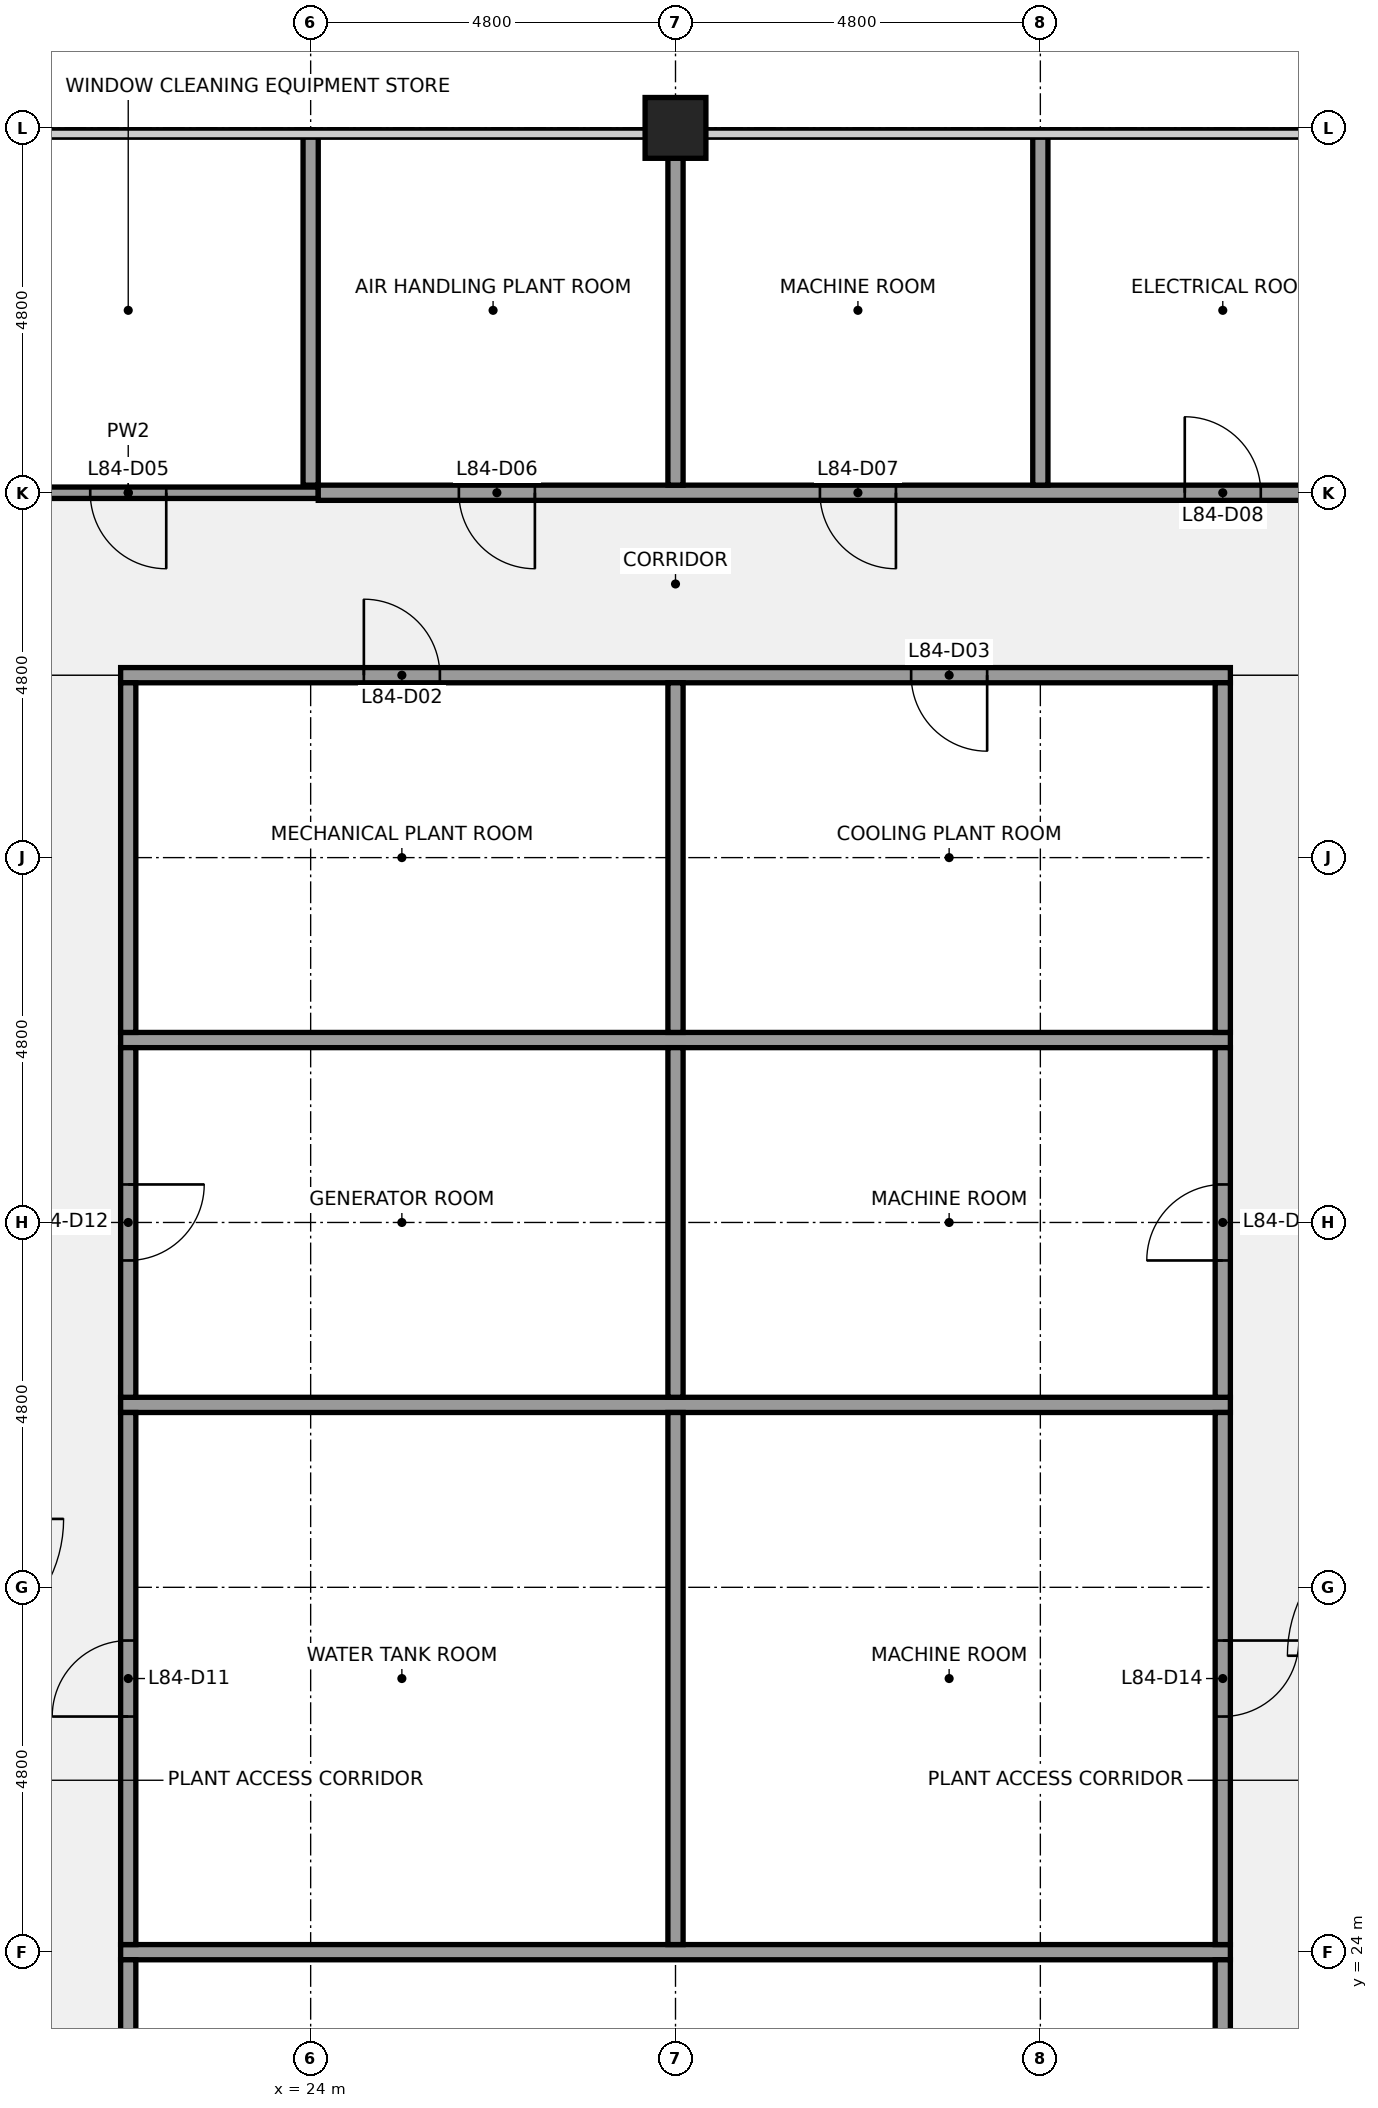
"""IFC4 building model, lengths in metres.
Left out: names, types, materials, properties, quantities, classifications, styles, units other than length and angle.
Written with IfcOpenShell. Run it as: python <this file> out.ifc"""

import sys

from ifc_helpers import new_model, si_unit, direction, frame, frame_2d, origin, origin_2d, place, context, subcontext, project, spatial, rectangle, extrude, element, fill, save


model = new_model("IFC4")
c1 = context("Model", 3, precision=1e-05, world=origin(), true_north=direction((0.0, 1.0)))
c2 = subcontext(c1, "Body", "Model", "MODEL_VIEW")
j1 = project(units=[si_unit("LENGTHUNIT", "METRE"), si_unit("PLANEANGLEUNIT", "RADIAN")], contexts=[c1])
p1 = place(None, origin())
s1 = spatial("IfcSite", under=j1, at=p1, CompositionType="ELEMENT")
p2 = place(p1, origin())
s2 = spatial("IfcBuilding", under=s1, at=p2, CompositionType="ELEMENT")
p3 = place(p2, frame((0.0, 0.0, 374.3)))
s3 = spatial("IfcBuildingStorey", under=s2, at=p3, CompositionType="ELEMENT", Elevation=374.3)
p4 = place(p3, frame((28.8, 48.0, 0.0), z_axis=(0.0, 0.0, 1.0), x_axis=(1.0, 0.0, 0.0)))
e1 = element("IfcColumn", 1, at=p4, inside=s3, PredefinedType="COLUMN", context=c2, shape_type="SweptSolid", body=[
    extrude(rectangle(XDim=0.8, YDim=0.8, at=origin_2d()), origin(), (0.0, 0.0, 1.0), 4.0),
])
for number, where, z_axis, x_axis in (
    (2, (21.5, 24.0, 0.0), (0.0, 0.0, 1.0), (1.0, 0.0, 0.0)),
    (3, (21.5, 31.2, 0.0), (0.0, 0.0, 1.0), (1.0, 0.0, 0.0)),
    (4, (21.5, 36.0, 0.0), (0.0, 0.0, 1.0), (1.0, 0.0, 0.0)),
):
    element("IfcWall", number, at=place(p3, frame(where, z_axis=z_axis, x_axis=x_axis)), inside=s3, PredefinedType="PARTITIONING", context=c2, shape_type="SweptSolid", body=[
        extrude(rectangle(XDim=14.6, YDim=0.2, at=frame_2d((7.3, 0.0))), origin(), (0.0, 0.0, 1.0), 2.9),
    ])
p5 = place(p3, frame((21.5, 40.8, 0.0), z_axis=(0.0, 0.0, 1.0), x_axis=(1.0, 0.0, 0.0)))
e5 = element("IfcWall", 5, at=p5, inside=s3, PredefinedType="PARTITIONING", context=c2, shape_type="SweptSolid", body=[
    extrude(rectangle(XDim=14.6, YDim=0.2, at=frame_2d((7.3, 0.0))), origin(), (0.0, 0.0, 1.0), 2.9),
])
p6 = place(p5, frame((3.2, 0.0, 0.0)))
e6 = element("IfcOpeningElement", 6, at=p6, cuts=e5, PredefinedType="OPENING", context=c2, shape_type="SweptSolid", body=[
    extrude(rectangle(XDim=1.0, YDim=2.1, at=frame_2d((0.5, 1.05))), frame((0.0, 0.11, 0.0), z_axis=(0.0, -1.0, 0.0), x_axis=(1.0, 0.0, 0.0)), (0.0, 0.0, 1.0), 0.22),
])
p7 = place(p5, frame((10.4, 0.0, 0.0)))
e7 = element("IfcOpeningElement", 7, at=p7, cuts=e5, PredefinedType="OPENING", context=c2, shape_type="SweptSolid", body=[
    extrude(rectangle(XDim=1.0, YDim=2.1, at=frame_2d((0.5, 1.05))), frame((0.0, 0.11, 0.0), z_axis=(0.0, -1.0, 0.0), x_axis=(1.0, 0.0, 0.0)), (0.0, 0.0, 1.0), 0.22),
])
p8 = place(p3, frame((19.1, 43.2, 0.0), z_axis=(0.0, 0.0, 1.0), x_axis=(1.0, 0.0, 0.0)))
e8 = element("IfcWall", 8, at=p8, inside=s3, PredefinedType="PARTITIONING", context=c2, shape_type="SweptSolid", body=[
    extrude(rectangle(XDim=5.0, YDim=0.15, at=frame_2d((2.5, 0.0))), origin(), (0.0, 0.0, 1.0), 2.9),
])
p9 = place(p8, frame((2.0, 0.0, 0.0)))
e9 = element("IfcOpeningElement", 9, at=p9, cuts=e8, PredefinedType="OPENING", context=c2, shape_type="SweptSolid", body=[
    extrude(rectangle(XDim=1.0, YDim=2.1, at=frame_2d((0.5, 1.05))), frame((0.0, 0.085, 0.0), z_axis=(0.0, -1.0, 0.0), x_axis=(1.0, 0.0, 0.0)), (0.0, 0.0, 1.0), 0.17),
])
p10 = place(p3, frame((24.1, 43.2, 0.0), z_axis=(0.0, 0.0, 1.0), x_axis=(1.0, 0.0, 0.0)))
e10 = element("IfcWall", 10, at=p10, inside=s3, PredefinedType="PARTITIONING", context=c2, shape_type="SweptSolid", body=[
    extrude(rectangle(XDim=14.4, YDim=0.2, at=frame_2d((7.2, 0.0))), origin(), (0.0, 0.0, 1.0), 2.9),
])
p11 = place(p10, frame((1.85, 0.0, 0.0)))
e11 = element("IfcOpeningElement", 11, at=p11, cuts=e10, PredefinedType="OPENING", context=c2, shape_type="SweptSolid", body=[
    extrude(rectangle(XDim=1.0, YDim=2.1, at=frame_2d((0.5, 1.05))), frame((0.0, 0.11, 0.0), z_axis=(0.0, -1.0, 0.0), x_axis=(1.0, 0.0, 0.0)), (0.0, 0.0, 1.0), 0.22),
])
p12 = place(p10, frame((6.6, 0.0, 0.0)))
e12 = element("IfcOpeningElement", 12, at=p12, cuts=e10, PredefinedType="OPENING", context=c2, shape_type="SweptSolid", body=[
    extrude(rectangle(XDim=1.0, YDim=2.1, at=frame_2d((0.5, 1.05))), frame((0.0, 0.11, 0.0), z_axis=(0.0, -1.0, 0.0), x_axis=(1.0, 0.0, 0.0)), (0.0, 0.0, 1.0), 0.22),
])
p13 = place(p10, frame((11.4, 0.0, 0.0)))
e13 = element("IfcOpeningElement", 13, at=p13, cuts=e10, PredefinedType="OPENING", context=c2, shape_type="SweptSolid", body=[
    extrude(rectangle(XDim=1.0, YDim=2.1, at=frame_2d((0.5, 1.05))), frame((0.0, 0.11, 0.0), z_axis=(0.0, -1.0, 0.0), x_axis=(1.0, 0.0, 0.0)), (0.0, 0.0, 1.0), 0.22),
])
p14 = place(p3, frame((21.6, 16.9, 0.0), z_axis=(0.0, 0.0, 1.0), x_axis=(0.0, 1.0, 0.0)))
e14 = element("IfcWall", 14, at=p14, inside=s3, PredefinedType="PARTITIONING", context=c2, shape_type="SweptSolid", body=[
    extrude(rectangle(XDim=7.0, YDim=0.2, at=frame_2d((3.5, 0.0))), origin(), (0.0, 0.0, 1.0), 2.9),
])
p15 = place(p14, frame((3.0, 0.0, 0.0)))
e15 = element("IfcOpeningElement", 15, at=p15, cuts=e14, PredefinedType="OPENING", context=c2, shape_type="SweptSolid", body=[
    extrude(rectangle(XDim=1.0, YDim=2.1, at=frame_2d((0.5, 1.05))), frame((0.0, 0.11, 0.0), z_axis=(0.0, -1.0, 0.0), x_axis=(1.0, 0.0, 0.0)), (0.0, 0.0, 1.0), 0.22),
])
p16 = place(p3, frame((21.6, 24.1, 0.0), z_axis=(0.0, 0.0, 1.0), x_axis=(0.0, 1.0, 0.0)))
e16 = element("IfcWall", 16, at=p16, inside=s3, PredefinedType="PARTITIONING", context=c2, shape_type="SweptSolid", body=[
    extrude(rectangle(XDim=7.0, YDim=0.2, at=frame_2d((3.5, 0.0))), origin(), (0.0, 0.0, 1.0), 2.9),
])
p17 = place(p16, frame((3.0, 0.0, 0.0)))
e17 = element("IfcOpeningElement", 17, at=p17, cuts=e16, PredefinedType="OPENING", context=c2, shape_type="SweptSolid", body=[
    extrude(rectangle(XDim=1.0, YDim=2.1, at=frame_2d((0.5, 1.05))), frame((0.0, 0.11, 0.0), z_axis=(0.0, -1.0, 0.0), x_axis=(1.0, 0.0, 0.0)), (0.0, 0.0, 1.0), 0.22),
])
p18 = place(p3, frame((21.6, 31.3, 0.0), z_axis=(0.0, 0.0, 1.0), x_axis=(0.0, 1.0, 0.0)))
e18 = element("IfcWall", 18, at=p18, inside=s3, PredefinedType="PARTITIONING", context=c2, shape_type="SweptSolid", body=[
    extrude(rectangle(XDim=4.6, YDim=0.2, at=frame_2d((2.3, 0.0))), origin(), (0.0, 0.0, 1.0), 2.9),
])
p19 = place(p18, frame((1.8, 0.0, 0.0)))
e19 = element("IfcOpeningElement", 19, at=p19, cuts=e18, PredefinedType="OPENING", context=c2, shape_type="SweptSolid", body=[
    extrude(rectangle(XDim=1.0, YDim=2.1, at=frame_2d((0.5, 1.05))), frame((0.0, 0.11, 0.0), z_axis=(0.0, -1.0, 0.0), x_axis=(1.0, 0.0, 0.0)), (0.0, 0.0, 1.0), 0.22),
])
for number, where, z_axis, x_axis in (
    (20, (21.6, 36.1, 0.0), (0.0, 0.0, 1.0), (0.0, 1.0, 0.0)),
    (21, (24.0, 43.3, 0.0), (0.0, 0.0, 1.0), (0.0, 1.0, 0.0)),
):
    element("IfcWall", number, at=place(p3, frame(where, z_axis=z_axis, x_axis=x_axis)), inside=s3, PredefinedType="PARTITIONING", context=c2, shape_type="SweptSolid", body=[
        extrude(rectangle(XDim=4.6, YDim=0.2, at=frame_2d((2.3, 0.0))), origin(), (0.0, 0.0, 1.0), 2.9),
    ])
p20 = place(p3, frame((28.8, 24.1, 0.0), z_axis=(0.0, 0.0, 1.0), x_axis=(0.0, 1.0, 0.0)))
e22 = element("IfcWall", 22, at=p20, inside=s3, PredefinedType="PARTITIONING", context=c2, shape_type="SweptSolid", body=[
    extrude(rectangle(XDim=7.0, YDim=0.2, at=frame_2d((3.5, 0.0))), origin(), (0.0, 0.0, 1.0), 2.9),
])
for number, where, z_axis, x_axis in (
    (23, (28.8, 31.3, 0.0), (0.0, 0.0, 1.0), (0.0, 1.0, 0.0)),
    (24, (28.8, 36.1, 0.0), (0.0, 0.0, 1.0), (0.0, 1.0, 0.0)),
):
    element("IfcWall", number, at=place(p3, frame(where, z_axis=z_axis, x_axis=x_axis)), inside=s3, PredefinedType="PARTITIONING", context=c2, shape_type="SweptSolid", body=[
        extrude(rectangle(XDim=4.6, YDim=0.2, at=frame_2d((2.3, 0.0))), origin(), (0.0, 0.0, 1.0), 2.9),
    ])
p21 = place(p3, frame((28.8, 43.3, 0.0), z_axis=(0.0, 0.0, 1.0), x_axis=(0.0, 1.0, 0.0)))
e25 = element("IfcWall", 25, at=p21, inside=s3, PredefinedType="PARTITIONING", context=c2, shape_type="SweptSolid", body=[
    extrude(rectangle(XDim=4.3, YDim=0.2, at=frame_2d((2.15, 0.0))), origin(), (0.0, 0.0, 1.0), 2.9),
])
p22 = place(p3, frame((33.6, 43.3, 0.0), z_axis=(0.0, 0.0, 1.0), x_axis=(0.0, 1.0, 0.0)))
e26 = element("IfcWall", 26, at=p22, inside=s3, PredefinedType="PARTITIONING", context=c2, shape_type="SweptSolid", body=[
    extrude(rectangle(XDim=4.6, YDim=0.2, at=frame_2d((2.3, 0.0))), origin(), (0.0, 0.0, 1.0), 2.9),
])
p23 = place(p3, frame((36.0, 16.9, 0.0), z_axis=(0.0, 0.0, 1.0), x_axis=(0.0, 1.0, 0.0)))
e27 = element("IfcWall", 27, at=p23, inside=s3, PredefinedType="PARTITIONING", context=c2, shape_type="SweptSolid", body=[
    extrude(rectangle(XDim=7.0, YDim=0.2, at=frame_2d((3.5, 0.0))), origin(), (0.0, 0.0, 1.0), 2.9),
])
p24 = place(p3, frame((36.0, 24.1, 0.0), z_axis=(0.0, 0.0, 1.0), x_axis=(0.0, 1.0, 0.0)))
e28 = element("IfcWall", 28, at=p24, inside=s3, PredefinedType="PARTITIONING", context=c2, shape_type="SweptSolid", body=[
    extrude(rectangle(XDim=7.0, YDim=0.2, at=frame_2d((3.5, 0.0))), origin(), (0.0, 0.0, 1.0), 2.9),
])
p25 = place(p24, frame((3.0, 0.0, 0.0)))
e29 = element("IfcOpeningElement", 29, at=p25, cuts=e28, PredefinedType="OPENING", context=c2, shape_type="SweptSolid", body=[
    extrude(rectangle(XDim=1.0, YDim=2.1, at=frame_2d((0.5, 1.05))), frame((0.0, 0.11, 0.0), z_axis=(0.0, -1.0, 0.0), x_axis=(1.0, 0.0, 0.0)), (0.0, 0.0, 1.0), 0.22),
])
p26 = place(p3, frame((36.0, 31.3, 0.0), z_axis=(0.0, 0.0, 1.0), x_axis=(0.0, 1.0, 0.0)))
e30 = element("IfcWall", 30, at=p26, inside=s3, PredefinedType="PARTITIONING", context=c2, shape_type="SweptSolid", body=[
    extrude(rectangle(XDim=4.6, YDim=0.2, at=frame_2d((2.3, 0.0))), origin(), (0.0, 0.0, 1.0), 2.9),
])
p27 = place(p26, frame((1.8, 0.0, 0.0)))
e31 = element("IfcOpeningElement", 31, at=p27, cuts=e30, PredefinedType="OPENING", context=c2, shape_type="SweptSolid", body=[
    extrude(rectangle(XDim=1.0, YDim=2.1, at=frame_2d((0.5, 1.05))), frame((0.0, 0.11, 0.0), z_axis=(0.0, -1.0, 0.0), x_axis=(1.0, 0.0, 0.0)), (0.0, 0.0, 1.0), 0.22),
])
p28 = place(p3, frame((36.0, 36.1, 0.0), z_axis=(0.0, 0.0, 1.0), x_axis=(0.0, 1.0, 0.0)))
e32 = element("IfcWall", 32, at=p28, inside=s3, PredefinedType="PARTITIONING", context=c2, shape_type="SweptSolid", body=[
    extrude(rectangle(XDim=4.6, YDim=0.2, at=frame_2d((2.3, 0.0))), origin(), (0.0, 0.0, 1.0), 2.9),
])
p29 = place(p6, origin())
e33 = element("IfcDoor", 33, at=p29, inside=s3, OperationType="SINGLE_SWING_LEFT", PredefinedType="DOOR", context=c2, shape_type="SweptSolid", body=[
    extrude(rectangle(XDim=1.0, YDim=2.1, at=frame_2d((0.5, 1.05))), frame((0.0, 0.025, 0.0), z_axis=(0.0, -1.0, 0.0), x_axis=(1.0, 0.0, 0.0)), (0.0, 0.0, 1.0), 0.05),
])
fill(e6, e33)
p30 = place(p7, origin())
e34 = element("IfcDoor", 34, at=p30, inside=s3, OperationType="SINGLE_SWING_RIGHT", PredefinedType="DOOR", context=c2, shape_type="SweptSolid", body=[
    extrude(rectangle(XDim=1.0, YDim=2.1, at=frame_2d((0.5, 1.05))), frame((0.0, 0.025, 0.0), z_axis=(0.0, -1.0, 0.0), x_axis=(1.0, 0.0, 0.0)), (0.0, 0.0, 1.0), 0.05),
])
fill(e7, e34)
p31 = place(p9, origin())
e35 = element("IfcDoor", 35, at=p31, inside=s3, OperationType="SINGLE_SWING_RIGHT", PredefinedType="DOOR", context=c2, shape_type="SweptSolid", body=[
    extrude(rectangle(XDim=1.0, YDim=2.1, at=frame_2d((0.5, 1.05))), frame((0.0, 0.025, 0.0), z_axis=(0.0, -1.0, 0.0), x_axis=(1.0, 0.0, 0.0)), (0.0, 0.0, 1.0), 0.05),
])
fill(e9, e35)
p32 = place(p11, origin())
e36 = element("IfcDoor", 36, at=p32, inside=s3, OperationType="SINGLE_SWING_RIGHT", PredefinedType="DOOR", context=c2, shape_type="SweptSolid", body=[
    extrude(rectangle(XDim=1.0, YDim=2.1, at=frame_2d((0.5, 1.05))), frame((0.0, 0.025, 0.0), z_axis=(0.0, -1.0, 0.0), x_axis=(1.0, 0.0, 0.0)), (0.0, 0.0, 1.0), 0.05),
])
fill(e11, e36)
p33 = place(p12, origin())
e37 = element("IfcDoor", 37, at=p33, inside=s3, OperationType="SINGLE_SWING_RIGHT", PredefinedType="DOOR", context=c2, shape_type="SweptSolid", body=[
    extrude(rectangle(XDim=1.0, YDim=2.1, at=frame_2d((0.5, 1.05))), frame((0.0, 0.025, 0.0), z_axis=(0.0, -1.0, 0.0), x_axis=(1.0, 0.0, 0.0)), (0.0, 0.0, 1.0), 0.05),
])
fill(e12, e37)
p34 = place(p13, origin())
e38 = element("IfcDoor", 38, at=p34, inside=s3, OperationType="SINGLE_SWING_LEFT", PredefinedType="DOOR", context=c2, shape_type="SweptSolid", body=[
    extrude(rectangle(XDim=1.0, YDim=2.1, at=frame_2d((0.5, 1.05))), frame((0.0, 0.025, 0.0), z_axis=(0.0, -1.0, 0.0), x_axis=(1.0, 0.0, 0.0)), (0.0, 0.0, 1.0), 0.05),
])
fill(e13, e38)
p35 = place(p17, origin())
e39 = element("IfcDoor", 39, at=p35, inside=s3, OperationType="SINGLE_SWING_LEFT", PredefinedType="DOOR", context=c2, shape_type="SweptSolid", body=[
    extrude(rectangle(XDim=1.0, YDim=2.1, at=frame_2d((0.5, 1.05))), frame((0.0, 0.025, 0.0), z_axis=(0.0, -1.0, 0.0), x_axis=(1.0, 0.0, 0.0)), (0.0, 0.0, 1.0), 0.05),
])
fill(e17, e39)
p36 = place(p19, origin())
e40 = element("IfcDoor", 40, at=p36, inside=s3, OperationType="SINGLE_SWING_RIGHT", PredefinedType="DOOR", context=c2, shape_type="SweptSolid", body=[
    extrude(rectangle(XDim=1.0, YDim=2.1, at=frame_2d((0.5, 1.05))), frame((0.0, 0.025, 0.0), z_axis=(0.0, -1.0, 0.0), x_axis=(1.0, 0.0, 0.0)), (0.0, 0.0, 1.0), 0.05),
])
fill(e19, e40)
p37 = place(p25, origin())
e41 = element("IfcDoor", 41, at=p37, inside=s3, OperationType="SINGLE_SWING_RIGHT", PredefinedType="DOOR", context=c2, shape_type="SweptSolid", body=[
    extrude(rectangle(XDim=1.0, YDim=2.1, at=frame_2d((0.5, 1.05))), frame((0.0, 0.025, 0.0), z_axis=(0.0, -1.0, 0.0), x_axis=(1.0, 0.0, 0.0)), (0.0, 0.0, 1.0), 0.05),
])
fill(e29, e41)
p38 = place(p27, origin())
e42 = element("IfcDoor", 42, at=p38, inside=s3, OperationType="SINGLE_SWING_LEFT", PredefinedType="DOOR", context=c2, shape_type="SweptSolid", body=[
    extrude(rectangle(XDim=1.0, YDim=2.1, at=frame_2d((0.5, 1.05))), frame((0.0, 0.025, 0.0), z_axis=(0.0, -1.0, 0.0), x_axis=(1.0, 0.0, 0.0)), (0.0, 0.0, 1.0), 0.05),
])
fill(e31, e42)
save(model, sys.argv[1])
